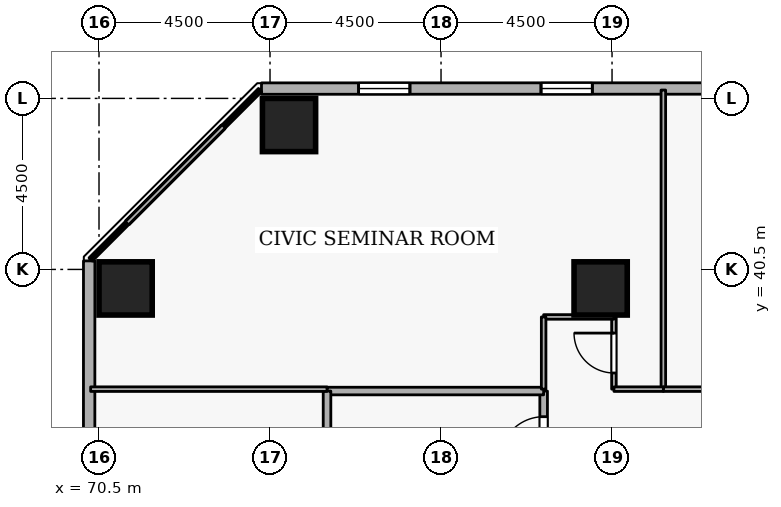
"""IFC4 building model, lengths in metres.
Left out: names, types, materials, properties, quantities, classifications, styles, units other than length and angle.
Written with IfcOpenShell. Run it as: python <this file> out.ifc"""

import sys

from ifc_helpers import new_model, si_unit, direction, frame, frame_2d, origin, origin_2d, place, context, subcontext, project, spatial, rectangle, extrude, element, fill, save


model = new_model("IFC4")
c1 = context("Model", 3, precision=1e-05, world=origin(), true_north=direction((0.0, 1.0)))
c2 = subcontext(c1, "Body", "Model", "MODEL_VIEW")
j1 = project(units=[si_unit("LENGTHUNIT", "METRE"), si_unit("PLANEANGLEUNIT", "RADIAN")], contexts=[c1])
p1 = place(None, origin())
s1 = spatial("IfcSite", under=j1, at=p1, CompositionType="ELEMENT")
p2 = place(p1, origin())
s2 = spatial("IfcBuilding", under=s1, at=p2, CompositionType="ELEMENT")
p3 = place(p2, frame((0.0, 0.0, 45.9)))
s3 = spatial("IfcBuildingStorey", under=s2, at=p3, CompositionType="ELEMENT", Elevation=45.9)
for number, where, z_axis, x_axis in (
    (1, (75.5, 44.3, 0.0), (0.0, 0.0, 1.0), (1.0, 0.0, 0.0)),
    (2, (71.2, 40.0, 0.0), (0.0, 0.0, 1.0), (1.0, 0.0, 0.0)),
    (3, (83.7, 40.0, 0.0), (0.0, 0.0, 1.0), (1.0, 0.0, 0.0)),
):
    element("IfcColumn", number, at=place(p3, frame(where, z_axis=z_axis, x_axis=x_axis)), inside=s3, PredefinedType="COLUMN", context=c2, shape_type="SweptSolid", body=[
        extrude(rectangle(XDim=1.4, YDim=1.4, at=origin_2d()), origin(), (0.0, 0.0, 1.0), 3.6),
    ])
p4 = place(p3, frame((110.181, 45.265, 0.0), z_axis=(0.0, 0.0, 1.0), x_axis=(-0.999999983929, -0.00017928314, 0.0)))
e4 = element("IfcWall", 4, at=p4, inside=s3, PredefinedType="STANDARD", context=c2, shape_type="SweptSolid", body=[
    extrude(rectangle(XDim=35.406, YDim=0.3, at=frame_2d((17.703, 0.0))), origin(), (0.0, 0.0, 1.0), 2.22),
])
p5 = place(p4, frame((2.7, 0.0, 0.72)))
e5 = element("IfcOpeningElement", 5, at=p5, cuts=e4, PredefinedType="OPENING", context=c2, shape_type="SweptSolid", body=[
    extrude(rectangle(XDim=1.35, YDim=1.05, at=frame_2d((0.675, 0.525))), frame((0.0, 0.16, 0.0), z_axis=(0.0, -1.0, 0.0), x_axis=(1.0, 0.0, 0.0)), (0.0, 0.0, 1.0), 0.32),
])
p6 = place(p4, frame((12.3, 0.0, 0.72)))
e6 = element("IfcOpeningElement", 6, at=p6, cuts=e4, PredefinedType="OPENING", context=c2, shape_type="SweptSolid", body=[
    extrude(rectangle(XDim=1.35, YDim=1.05, at=frame_2d((0.675, 0.525))), frame((0.0, 0.16, 0.0), z_axis=(0.0, -1.0, 0.0), x_axis=(1.0, 0.0, 0.0)), (0.0, 0.0, 1.0), 0.32),
])
p7 = place(p4, frame((17.1, 0.0, 0.72)))
e7 = element("IfcOpeningElement", 7, at=p7, cuts=e4, PredefinedType="OPENING", context=c2, shape_type="SweptSolid", body=[
    extrude(rectangle(XDim=1.35, YDim=1.05, at=frame_2d((0.675, 0.525))), frame((0.0, 0.16, 0.0), z_axis=(0.0, -1.0, 0.0), x_axis=(1.0, 0.0, 0.0)), (0.0, 0.0, 1.0), 0.32),
])
p8 = place(p4, frame((26.7, 0.0, 0.72)))
e8 = element("IfcOpeningElement", 8, at=p8, cuts=e4, PredefinedType="OPENING", context=c2, shape_type="SweptSolid", body=[
    extrude(rectangle(XDim=1.35, YDim=1.05, at=frame_2d((0.675, 0.525))), frame((0.0, 0.16, 0.0), z_axis=(0.0, -1.0, 0.0), x_axis=(1.0, 0.0, 0.0)), (0.0, 0.0, 1.0), 0.32),
])
p9 = place(p4, frame((31.5, 0.0, 0.72)))
e9 = element("IfcOpeningElement", 9, at=p9, cuts=e4, PredefinedType="OPENING", context=c2, shape_type="SweptSolid", body=[
    extrude(rectangle(XDim=1.35, YDim=1.05, at=frame_2d((0.675, 0.525))), frame((0.0, 0.16, 0.0), z_axis=(0.0, -1.0, 0.0), x_axis=(1.0, 0.0, 0.0)), (0.0, 0.0, 1.0), 0.32),
])
p10 = place(p3, frame((70.241, 40.725, 0.0), z_axis=(0.0, 0.0, 1.0), x_axis=(-0.00017928314, -0.999999983929, 0.0)))
e10 = element("IfcWall", 10, at=p10, inside=s3, PredefinedType="STANDARD", context=c2, shape_type="SweptSolid", body=[
    extrude(rectangle(XDim=35.406, YDim=0.3, at=frame_2d((17.703, 0.0))), origin(), (0.0, 0.0, 1.0), 2.22),
])
p11 = place(p10, frame((7.5, 0.0, 0.72)))
e11 = element("IfcOpeningElement", 11, at=p11, cuts=e10, PredefinedType="OPENING", context=c2, shape_type="SweptSolid", body=[
    extrude(rectangle(XDim=1.35, YDim=1.05, at=frame_2d((0.675, 0.525))), frame((0.0, 0.16, 0.0), z_axis=(0.0, -1.0, 0.0), x_axis=(1.0, 0.0, 0.0)), (0.0, 0.0, 1.0), 0.32),
])
p12 = place(p10, frame((17.1, 0.0, 0.72)))
e12 = element("IfcOpeningElement", 12, at=p12, cuts=e10, PredefinedType="OPENING", context=c2, shape_type="SweptSolid", body=[
    extrude(rectangle(XDim=1.35, YDim=1.05, at=frame_2d((0.675, 0.525))), frame((0.0, 0.16, 0.0), z_axis=(0.0, -1.0, 0.0), x_axis=(1.0, 0.0, 0.0)), (0.0, 0.0, 1.0), 0.32),
])
p13 = place(p10, frame((21.9, 0.0, 0.72)))
e13 = element("IfcOpeningElement", 13, at=p13, cuts=e10, PredefinedType="OPENING", context=c2, shape_type="SweptSolid", body=[
    extrude(rectangle(XDim=1.35, YDim=1.05, at=frame_2d((0.675, 0.525))), frame((0.0, 0.16, 0.0), z_axis=(0.0, -1.0, 0.0), x_axis=(1.0, 0.0, 0.0)), (0.0, 0.0, 1.0), 0.32),
])
p14 = place(p10, frame((31.5, 0.0, 0.72)))
e14 = element("IfcOpeningElement", 14, at=p14, cuts=e10, PredefinedType="OPENING", context=c2, shape_type="SweptSolid", body=[
    extrude(rectangle(XDim=1.35, YDim=1.05, at=frame_2d((0.675, 0.525))), frame((0.0, 0.16, 0.0), z_axis=(0.0, -1.0, 0.0), x_axis=(1.0, 0.0, 0.0)), (0.0, 0.0, 1.0), 0.32),
])
p15 = place(p3, frame((82.2, 34.8, 0.0), z_axis=(0.0, 0.0, 1.0), x_axis=(0.0, 1.0, 0.0)))
e15 = element("IfcWall", 15, at=p15, inside=s3, PredefinedType="STANDARD", context=c2, shape_type="SweptSolid", body=[
    extrude(rectangle(XDim=2.5, YDim=0.2, at=frame_2d((1.25, 0.0))), origin(), (0.0, 0.0, 1.0), 3.26),
])
p16 = place(p15, frame((0.675, 0.0, 0.0)))
e16 = element("IfcOpeningElement", 16, at=p16, cuts=e15, PredefinedType="OPENING", context=c2, shape_type="SweptSolid", body=[
    extrude(rectangle(XDim=1.15, YDim=2.1, at=frame_2d((0.575, 1.05))), frame((0.0, 0.11, 0.0), z_axis=(0.0, -1.0, 0.0), x_axis=(1.0, 0.0, 0.0)), (0.0, 0.0, 1.0), 0.22),
])
p17 = place(p3, frame((82.2, 37.3, 0.0), z_axis=(0.0, 0.0, 1.0), x_axis=(-1.0, 0.0, 0.0)))
e17 = element("IfcWall", 17, at=p17, inside=s3, PredefinedType="STANDARD", context=c2, shape_type="SweptSolid", body=[
    extrude(rectangle(XDim=5.7, YDim=0.2, at=frame_2d((2.85, 0.0))), origin(), (0.0, 0.0, 1.0), 3.26),
])
p18 = place(p3, frame((76.5, 37.3, 0.0), z_axis=(0.0, 0.0, 1.0), x_axis=(0.0, -1.0, 0.0)))
e18 = element("IfcWall", 18, at=p18, inside=s3, PredefinedType="STANDARD", context=c2, shape_type="SweptSolid", body=[
    extrude(rectangle(XDim=2.5, YDim=0.2, at=frame_2d((1.25, 0.0))), origin(), (0.0, 0.0, 1.0), 3.26),
])
p19 = place(p3, frame((85.35, 37.35, 0.0), z_axis=(0.0, 0.0, 1.0), x_axis=(0.0, 1.0, 0.0)))
e19 = element("IfcWall", 19, at=p19, inside=s3, PredefinedType="PARTITIONING", context=c2, shape_type="SweptSolid", body=[
    extrude(rectangle(XDim=7.87, YDim=0.12, at=frame_2d((3.935, 0.0))), origin(), (0.0, 0.0, 1.0), 3.26),
])
p20 = place(p3, frame((88.5, 37.35, 0.0), z_axis=(0.0, 0.0, 1.0), x_axis=(-1.0, 0.0, 0.0)))
e20 = element("IfcWall", 20, at=p20, inside=s3, PredefinedType="PARTITIONING", context=c2, shape_type="SweptSolid", body=[
    extrude(rectangle(XDim=3.15, YDim=0.12, at=frame_2d((1.575, 0.0))), origin(), (0.0, 0.0, 1.0), 3.26),
])
p21 = place(p20, frame((1.1, 0.0, 0.0)))
e21 = element("IfcOpeningElement", 21, at=p21, cuts=e20, PredefinedType="OPENING", context=c2, shape_type="SweptSolid", body=[
    extrude(rectangle(XDim=0.95, YDim=2.1, at=frame_2d((0.475, 1.05))), frame((0.0, 0.07, 0.0), z_axis=(0.0, -1.0, 0.0), x_axis=(1.0, 0.0, 0.0)), (0.0, 0.0, 1.0), 0.14),
])
p22 = place(p3, frame((84.05, 37.35, 0.0), z_axis=(0.0, 0.0, 1.0), x_axis=(0.0, 1.0, 0.0)))
e22 = element("IfcWall", 22, at=p22, inside=s3, PredefinedType="PARTITIONING", context=c2, shape_type="SweptSolid", body=[
    extrude(rectangle(XDim=1.9, YDim=0.12, at=frame_2d((0.95, 0.0))), origin(), (0.0, 0.0, 1.0), 3.26),
])
p23 = place(p22, frame((0.425, 0.0, 0.0)))
e23 = element("IfcOpeningElement", 23, at=p23, cuts=e22, PredefinedType="OPENING", context=c2, shape_type="SweptSolid", body=[
    extrude(rectangle(XDim=1.05, YDim=2.1, at=frame_2d((0.525, 1.05))), frame((0.0, 0.07, 0.0), z_axis=(0.0, -1.0, 0.0), x_axis=(1.0, 0.0, 0.0)), (0.0, 0.0, 1.0), 0.14),
])
p24 = place(p3, frame((84.05, 39.25, 0.0), z_axis=(0.0, 0.0, 1.0), x_axis=(-1.0, 0.0, 0.0)))
e24 = element("IfcWall", 24, at=p24, inside=s3, PredefinedType="PARTITIONING", context=c2, shape_type="SweptSolid", body=[
    extrude(rectangle(XDim=1.85, YDim=0.12, at=frame_2d((0.925, 0.0))), origin(), (0.0, 0.0, 1.0), 3.26),
])
p25 = place(p3, frame((82.2, 39.25, 0.0), z_axis=(0.0, 0.0, 1.0), x_axis=(0.0, -1.0, 0.0)))
e25 = element("IfcWall", 25, at=p25, inside=s3, PredefinedType="PARTITIONING", context=c2, shape_type="SweptSolid", body=[
    extrude(rectangle(XDim=1.9, YDim=0.12, at=frame_2d((0.95, 0.0))), origin(), (0.0, 0.0, 1.0), 3.26),
])
p26 = place(p3, frame((76.5, 37.35, 0.0), z_axis=(0.0, 0.0, 1.0), x_axis=(-1.0, 0.0, 0.0)))
e26 = element("IfcWall", 26, at=p26, inside=s3, PredefinedType="PARTITIONING", context=c2, shape_type="SweptSolid", body=[
    extrude(rectangle(XDim=6.22, YDim=0.12, at=frame_2d((3.11, 0.0))), origin(), (0.0, 0.0, 1.0), 3.26),
])
p27 = place(p3, frame((70.28, 40.761, 0.0), z_axis=(0.0, 0.0, 1.0), x_axis=(0.707106781187, 0.707106781187, 0.0)))
e27 = element("IfcWall", 27, at=p27, inside=s3, PredefinedType="PARTITIONING", context=c2, shape_type="SweptSolid", body=[
    extrude(rectangle(XDim=6.305, YDim=0.12, at=frame_2d((3.153, 0.0))), origin(), (0.0, 0.0, 1.0), 3.26),
])
p28 = place(p3, frame((85.35, 37.35, 0.0), z_axis=(0.0, 0.0, 1.0), x_axis=(-1.0, 0.0, 0.0)))
e28 = element("IfcWall", 28, at=p28, inside=s3, PredefinedType="PARTITIONING", context=c2, shape_type="SweptSolid", body=[
    extrude(rectangle(XDim=1.3, YDim=0.12, at=frame_2d((0.65, 0.0))), origin(), (0.0, 0.0, 1.0), 3.26),
])
p29 = place(p8, origin())
e29 = element("IfcWindow", 29, at=p29, inside=s3, PartitioningType="SINGLE_PANEL", PredefinedType="WINDOW", context=c2, shape_type="SweptSolid", body=[
    extrude(rectangle(XDim=1.35, YDim=1.05, at=frame_2d((0.675, 0.525))), frame((0.0, 0.03, 0.0), z_axis=(0.0, -1.0, 0.0), x_axis=(1.0, 0.0, 0.0)), (0.0, 0.0, 1.0), 0.06),
])
fill(e8, e29)
p30 = place(p9, origin())
e30 = element("IfcWindow", 30, at=p30, inside=s3, PartitioningType="SINGLE_PANEL", PredefinedType="WINDOW", context=c2, shape_type="SweptSolid", body=[
    extrude(rectangle(XDim=1.35, YDim=1.05, at=frame_2d((0.675, 0.525))), frame((0.0, 0.03, 0.0), z_axis=(0.0, -1.0, 0.0), x_axis=(1.0, 0.0, 0.0)), (0.0, 0.0, 1.0), 0.06),
])
fill(e9, e30)
p31 = place(p16, origin())
e31 = element("IfcDoor", 31, at=p31, inside=s3, OperationType="SINGLE_SWING_LEFT", PredefinedType="DOOR", context=c2, shape_type="SweptSolid", body=[
    extrude(rectangle(XDim=1.15, YDim=2.1, at=frame_2d((0.575, 1.05))), frame((0.0, 0.025, 0.0), z_axis=(0.0, -1.0, 0.0), x_axis=(1.0, 0.0, 0.0)), (0.0, 0.0, 1.0), 0.05),
])
fill(e16, e31)
p32 = place(p23, origin())
e32 = element("IfcDoor", 32, at=p32, inside=s3, OperationType="SINGLE_SWING_RIGHT", PredefinedType="DOOR", context=c2, shape_type="SweptSolid", body=[
    extrude(rectangle(XDim=1.05, YDim=2.1, at=frame_2d((0.525, 1.05))), frame((0.0, 0.025, 0.0), z_axis=(0.0, -1.0, 0.0), x_axis=(1.0, 0.0, 0.0)), (0.0, 0.0, 1.0), 0.05),
])
fill(e23, e32)
save(model, sys.argv[1])
